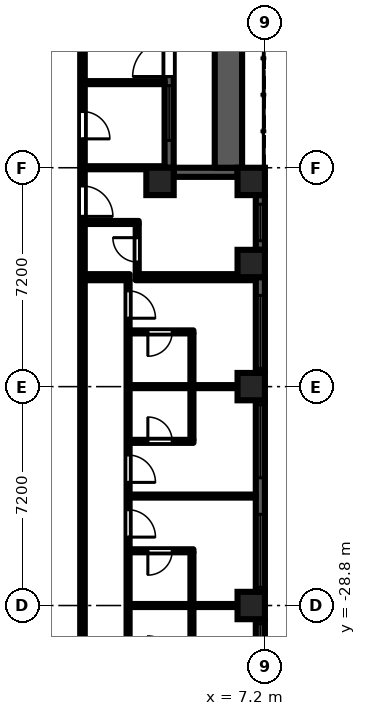
"""IFC4 building model, lengths in metres.
Left out: names, types, materials, properties, quantities, classifications, styles, units other than length and angle.
Written with IfcOpenShell. Run it as: python <this file> out.ifc"""

import sys

from ifc_helpers import new_model, si_unit, direction, frame, frame_2d, origin, origin_2d, place, context, subcontext, project, spatial, rectangle, extrude, element, fill, save


model = new_model("IFC4")
c1 = context("Model", 3, precision=1e-05, world=origin(), true_north=direction((0.0, 1.0)))
c2 = subcontext(c1, "Body", "Model", "MODEL_VIEW")
j1 = project(units=[si_unit("LENGTHUNIT", "METRE"), si_unit("PLANEANGLEUNIT", "RADIAN")], contexts=[c1])
p1 = place(None, origin())
s1 = spatial("IfcSite", under=j1, at=p1, CompositionType="ELEMENT")
p2 = place(p1, origin())
s2 = spatial("IfcBuilding", under=s1, at=p2, CompositionType="ELEMENT")
p3 = place(p2, frame((0.0, 0.0, 66.9)))
s3 = spatial("IfcBuildingStorey", under=s2, at=p3, CompositionType="ELEMENT", Elevation=66.9)
for number, where, z_axis, x_axis in (
    (1, (3.75, -14.85, 0.0), (0.0, 0.0, 1.0), (1.0, 0.0, 0.0)),
    (2, (6.75, -28.8, 0.0), (0.0, 0.0, 1.0), (1.0, 0.0, 0.0)),
    (3, (6.75, -21.6, 0.0), (0.0, 0.0, 1.0), (1.0, 0.0, 0.0)),
    (4, (6.75, -17.55, 0.0), (0.0, 0.0, 1.0), (1.0, 0.0, 0.0)),
    (5, (6.75, -14.85, 0.0), (0.0, 0.0, 1.0), (1.0, 0.0, 0.0)),
):
    element("IfcColumn", number, at=place(p3, frame(where, z_axis=z_axis, x_axis=x_axis)), inside=s3, PredefinedType="COLUMN", context=c2, shape_type="SweptSolid", body=[
        extrude(rectangle(XDim=0.9, YDim=0.9, at=origin_2d()), origin(), (0.0, 0.0, 1.0), 3.0),
    ])
p4 = place(p3, frame((7.05, -35.55, 0.0), z_axis=(0.0, 0.0, 1.0), x_axis=(0.0, 1.0, 0.0)))
e6 = element("IfcWall", 6, at=p4, inside=s3, PredefinedType="SOLIDWALL", context=c2, shape_type="SweptSolid", body=[
    extrude(rectangle(XDim=6.3, YDim=0.3, at=frame_2d((3.15, 0.0))), origin(), (0.0, 0.0, 1.0), 2.1),
])
p5 = place(p4, frame((3.75, 0.0, 0.2)))
e7 = element("IfcOpeningElement", 7, at=p5, cuts=e6, PredefinedType="OPENING", context=c2, shape_type="SweptSolid", body=[
    extrude(rectangle(XDim=2.4, YDim=1.85, at=frame_2d((1.2, 0.925))), frame((0.0, 0.16, 0.0), z_axis=(0.0, -1.0, 0.0), x_axis=(1.0, 0.0, 0.0)), (0.0, 0.0, 1.0), 0.32),
])
p6 = place(p3, frame((7.05, -28.35, 0.0), z_axis=(0.0, 0.0, 1.0), x_axis=(0.0, 1.0, 0.0)))
e8 = element("IfcWall", 8, at=p6, inside=s3, PredefinedType="SOLIDWALL", context=c2, shape_type="SweptSolid", body=[
    extrude(rectangle(XDim=6.3, YDim=0.3, at=frame_2d((3.15, 0.0))), origin(), (0.0, 0.0, 1.0), 2.1),
])
p7 = place(p6, frame((0.15, 0.0, 0.2)))
e9 = element("IfcOpeningElement", 9, at=p7, cuts=e8, PredefinedType="OPENING", context=c2, shape_type="SweptSolid", body=[
    extrude(rectangle(XDim=2.4, YDim=1.85, at=frame_2d((1.2, 0.925))), frame((0.0, 0.16, 0.0), z_axis=(0.0, -1.0, 0.0), x_axis=(1.0, 0.0, 0.0)), (0.0, 0.0, 1.0), 0.32),
])
p8 = place(p6, frame((3.75, 0.0, 0.2)))
e10 = element("IfcOpeningElement", 10, at=p8, cuts=e8, PredefinedType="OPENING", context=c2, shape_type="SweptSolid", body=[
    extrude(rectangle(XDim=2.4, YDim=1.85, at=frame_2d((1.2, 0.925))), frame((0.0, 0.16, 0.0), z_axis=(0.0, -1.0, 0.0), x_axis=(1.0, 0.0, 0.0)), (0.0, 0.0, 1.0), 0.32),
])
p9 = place(p3, frame((7.05, -21.15, 0.0), z_axis=(0.0, 0.0, 1.0), x_axis=(0.0, 1.0, 0.0)))
e11 = element("IfcWall", 11, at=p9, inside=s3, PredefinedType="SOLIDWALL", context=c2, shape_type="SweptSolid", body=[
    extrude(rectangle(XDim=3.15, YDim=0.3, at=frame_2d((1.575, 0.0))), origin(), (0.0, 0.0, 1.0), 2.1),
])
p10 = place(p9, frame((0.15, 0.0, 0.2)))
e12 = element("IfcOpeningElement", 12, at=p10, cuts=e11, PredefinedType="OPENING", context=c2, shape_type="SweptSolid", body=[
    extrude(rectangle(XDim=2.4, YDim=1.85, at=frame_2d((1.2, 0.925))), frame((0.0, 0.16, 0.0), z_axis=(0.0, -1.0, 0.0), x_axis=(1.0, 0.0, 0.0)), (0.0, 0.0, 1.0), 0.32),
])
p11 = place(p3, frame((7.05, -17.1, 0.0), z_axis=(0.0, 0.0, 1.0), x_axis=(0.0, 1.0, 0.0)))
e13 = element("IfcWall", 13, at=p11, inside=s3, PredefinedType="SOLIDWALL", context=c2, shape_type="SweptSolid", body=[
    extrude(rectangle(XDim=1.8, YDim=0.3, at=frame_2d((0.9, 0.0))), origin(), (0.0, 0.0, 1.0), 2.1),
])
p12 = place(p11, frame((0.3, 0.0, 0.2)))
e14 = element("IfcOpeningElement", 14, at=p12, cuts=e13, PredefinedType="OPENING", context=c2, shape_type="SweptSolid", body=[
    extrude(rectangle(XDim=1.2, YDim=1.85, at=frame_2d((0.6, 0.925))), frame((0.0, 0.16, 0.0), z_axis=(0.0, -1.0, 0.0), x_axis=(1.0, 0.0, 0.0)), (0.0, 0.0, 1.0), 0.32),
])
p13 = place(p3, frame((6.3, -14.55, 0.0), z_axis=(0.0, 0.0, 1.0), x_axis=(-1.0, 0.0, 0.0)))
e15 = element("IfcWall", 15, at=p13, inside=s3, PredefinedType="SOLIDWALL", context=c2, shape_type="SweptSolid", body=[
    extrude(rectangle(XDim=2.1, YDim=0.3, at=frame_2d((1.05, 0.0))), origin(), (0.0, 0.0, 1.0), 2.1),
])
p14 = place(p3, frame((4.05, -14.4, 0.0), z_axis=(0.0, 0.0, 1.0), x_axis=(0.0, 1.0, 0.0)))
e16 = element("IfcWall", 16, at=p14, inside=s3, PredefinedType="SOLIDWALL", context=c2, shape_type="SweptSolid", body=[
    extrude(rectangle(XDim=7.2, YDim=0.3, at=frame_2d((3.6, 0.0))), origin(), (0.0, 0.0, 1.0), 2.1),
])
p15 = place(p14, frame((3.0, 0.0, 0.0)))
e17 = element("IfcOpeningElement", 17, at=p15, cuts=e16, PredefinedType="OPENING", context=c2, shape_type="SweptSolid", body=[
    extrude(rectangle(XDim=1.2, YDim=2.05, at=frame_2d((0.6, 1.025))), frame((0.0, 0.16, 0.0), z_axis=(0.0, -1.0, 0.0), x_axis=(1.0, 0.0, 0.0)), (0.0, 0.0, 1.0), 0.32),
])
p16 = place(p14, frame((0.9, 0.0, 0.2)))
e18 = element("IfcOpeningElement", 18, at=p16, cuts=e16, PredefinedType="OPENING", context=c2, shape_type="SweptSolid", body=[
    extrude(rectangle(XDim=1.8, YDim=1.85, at=frame_2d((0.9, 0.925))), frame((0.0, 0.16, 0.0), z_axis=(0.0, -1.0, 0.0), x_axis=(1.0, 0.0, 0.0)), (0.0, 0.0, 1.0), 0.32),
])
p17 = place(p14, frame((4.5, 0.0, 0.2)))
e19 = element("IfcOpeningElement", 19, at=p17, cuts=e16, PredefinedType="OPENING", context=c2, shape_type="SweptSolid", body=[
    extrude(rectangle(XDim=1.8, YDim=1.85, at=frame_2d((0.9, 0.925))), frame((0.0, 0.16, 0.0), z_axis=(0.0, -1.0, 0.0), x_axis=(1.0, 0.0, 0.0)), (0.0, 0.0, 1.0), 0.32),
])
p18 = place(p3, frame((6.0, -14.4, 0.0), z_axis=(0.0, 0.0, 1.0), x_axis=(0.0, 1.0, 0.0)))
e20 = element("IfcWall", 20, at=p18, inside=s3, PredefinedType="PARAPET", context=c2, shape_type="SweptSolid", body=[
    extrude(rectangle(XDim=7.2, YDim=0.9, at=frame_2d((3.6, 0.0))), origin(), (0.0, 0.0, 1.0), 0.8),
])
p19 = place(p3, frame((1.2, -36.5, 0.0), z_axis=(0.0, 0.0, 1.0), x_axis=(0.0, 1.0, 0.0)))
e21 = element("IfcWall", 21, at=p19, inside=s3, PredefinedType="PARTITIONING", context=c2, shape_type="SweptSolid", body=[
    extrude(rectangle(XDim=35.375, YDim=0.15, at=frame_2d((17.688, 0.0))), origin(), (0.0, 0.0, 1.0), 2.575),
])
p20 = place(p19, frame((31.85, 0.0, 0.0)))
e22 = element("IfcOpeningElement", 22, at=p20, cuts=e21, PredefinedType="OPENING", context=c2, shape_type="SweptSolid", body=[
    extrude(rectangle(XDim=0.9, YDim=2.1, at=frame_2d((0.45, 1.05))), frame((0.0, 0.085, 0.0), z_axis=(0.0, -1.0, 0.0), x_axis=(1.0, 0.0, 0.0)), (0.0, 0.0, 1.0), 0.17),
])
p21 = place(p19, frame((23.05, 0.0, 0.0)))
e23 = element("IfcOpeningElement", 23, at=p21, cuts=e21, PredefinedType="OPENING", context=c2, shape_type="SweptSolid", body=[
    extrude(rectangle(XDim=0.9, YDim=2.1, at=frame_2d((0.45, 1.05))), frame((0.0, 0.085, 0.0), z_axis=(0.0, -1.0, 0.0), x_axis=(1.0, 0.0, 0.0)), (0.0, 0.0, 1.0), 0.17),
])
p22 = place(p19, frame((26.65, 0.0, 0.0)))
e24 = element("IfcOpeningElement", 24, at=p22, cuts=e21, PredefinedType="OPENING", context=c2, shape_type="SweptSolid", body=[
    extrude(rectangle(XDim=0.9, YDim=2.1, at=frame_2d((0.45, 1.05))), frame((0.0, 0.085, 0.0), z_axis=(0.0, -1.0, 0.0), x_axis=(1.0, 0.0, 0.0)), (0.0, 0.0, 1.0), 0.17),
])
p23 = place(p19, frame((20.5, 0.0, 0.0)))
e25 = element("IfcOpeningElement", 25, at=p23, cuts=e21, PredefinedType="OPENING", context=c2, shape_type="SweptSolid", body=[
    extrude(rectangle(XDim=1.0, YDim=2.1, at=frame_2d((0.5, 1.05))), frame((0.0, 0.085, 0.0), z_axis=(0.0, -1.0, 0.0), x_axis=(1.0, 0.0, 0.0)), (0.0, 0.0, 1.0), 0.17),
])
p24 = place(p19, frame((1.55, 0.0, 0.0)))
e26 = element("IfcOpeningElement", 26, at=p24, cuts=e21, PredefinedType="OPENING", context=c2, shape_type="SweptSolid", body=[
    extrude(rectangle(XDim=1.0, YDim=2.1, at=frame_2d((0.5, 1.05))), frame((0.0, 0.085, 0.0), z_axis=(0.0, -1.0, 0.0), x_axis=(1.0, 0.0, 0.0)), (0.0, 0.0, 1.0), 0.17),
])
p25 = place(p3, frame((1.275, -18.0, 0.0), z_axis=(0.0, 0.0, 1.0), x_axis=(1.0, 0.0, 0.0)))
e27 = element("IfcWall", 27, at=p25, inside=s3, PredefinedType="PARTITIONING", context=c2, shape_type="SweptSolid", body=[
    extrude(rectangle(XDim=1.475, YDim=0.2, at=frame_2d((0.738, 0.0))), origin(), (0.0, 0.0, 1.0), 2.575),
])
p26 = place(p3, frame((1.275, -16.2, 0.0), z_axis=(0.0, 0.0, 1.0), x_axis=(1.0, 0.0, 0.0)))
e28 = element("IfcWall", 28, at=p26, inside=s3, PredefinedType="PARTITIONING", context=c2, shape_type="SweptSolid", body=[
    extrude(rectangle(XDim=1.775, YDim=0.1, at=frame_2d((0.888, 0.0))), origin(), (0.0, 0.0, 1.0), 2.575),
])
for number, where, z_axis, x_axis in (
    (29, (1.275, -14.4, 0.0), (0.0, 0.0, 1.0), (1.0, 0.0, 0.0)),
    (30, (1.275, -11.6, 0.0), (0.0, 0.0, 1.0), (1.0, 0.0, 0.0)),
):
    element("IfcWall", number, at=place(p3, frame(where, z_axis=z_axis, x_axis=x_axis)), inside=s3, PredefinedType="PARTITIONING", context=c2, shape_type="SweptSolid", body=[
        extrude(rectangle(XDim=2.625, YDim=0.1, at=frame_2d((1.312, 0.0))), origin(), (0.0, 0.0, 1.0), 2.575),
    ])
p27 = place(p3, frame((2.7, -32.35, 0.0), z_axis=(0.0, 0.0, 1.0), x_axis=(0.0, 1.0, 0.0)))
e31 = element("IfcWall", 31, at=p27, inside=s3, PredefinedType="PARTITIONING", context=c2, shape_type="SweptSolid", body=[
    extrude(rectangle(XDim=14.25, YDim=0.1, at=frame_2d((7.125, 0.0))), origin(), (0.0, 0.0, 1.0), 2.575),
])
p28 = place(p27, frame((0.4, 0.0, 0.0)))
e32 = element("IfcOpeningElement", 32, at=p28, cuts=e31, PredefinedType="OPENING", context=c2, shape_type="SweptSolid", body=[
    extrude(rectangle(XDim=0.9, YDim=2.1, at=frame_2d((0.45, 1.05))), frame((0.0, 0.06, 0.0), z_axis=(0.0, -1.0, 0.0), x_axis=(1.0, 0.0, 0.0)), (0.0, 0.0, 1.0), 0.12),
])
p29 = place(p27, frame((5.8, 0.0, 0.0)))
e33 = element("IfcOpeningElement", 33, at=p29, cuts=e31, PredefinedType="OPENING", context=c2, shape_type="SweptSolid", body=[
    extrude(rectangle(XDim=0.9, YDim=2.1, at=frame_2d((0.45, 1.05))), frame((0.0, 0.06, 0.0), z_axis=(0.0, -1.0, 0.0), x_axis=(1.0, 0.0, 0.0)), (0.0, 0.0, 1.0), 0.12),
])
p30 = place(p27, frame((7.6, 0.0, 0.0)))
e34 = element("IfcOpeningElement", 34, at=p30, cuts=e31, PredefinedType="OPENING", context=c2, shape_type="SweptSolid", body=[
    extrude(rectangle(XDim=0.9, YDim=2.1, at=frame_2d((0.45, 1.05))), frame((0.0, 0.06, 0.0), z_axis=(0.0, -1.0, 0.0), x_axis=(1.0, 0.0, 0.0)), (0.0, 0.0, 1.0), 0.12),
])
p31 = place(p27, frame((13.0, 0.0, 0.0)))
e35 = element("IfcOpeningElement", 35, at=p31, cuts=e31, PredefinedType="OPENING", context=c2, shape_type="SweptSolid", body=[
    extrude(rectangle(XDim=0.9, YDim=2.1, at=frame_2d((0.45, 1.05))), frame((0.0, 0.06, 0.0), z_axis=(0.0, -1.0, 0.0), x_axis=(1.0, 0.0, 0.0)), (0.0, 0.0, 1.0), 0.12),
])
p32 = place(p3, frame((2.75, -28.8, 0.0), z_axis=(0.0, 0.0, 1.0), x_axis=(1.0, 0.0, 0.0)))
e36 = element("IfcWall", 36, at=p32, inside=s3, PredefinedType="PARTITIONING", context=c2, shape_type="SweptSolid", body=[
    extrude(rectangle(XDim=4.15, YDim=0.1, at=frame_2d((2.075, 0.0))), origin(), (0.0, 0.0, 1.0), 2.575),
])
p33 = place(p3, frame((2.75, -27.0, 0.0), z_axis=(0.0, 0.0, 1.0), x_axis=(1.0, 0.0, 0.0)))
e37 = element("IfcWall", 37, at=p33, inside=s3, PredefinedType="PARTITIONING", context=c2, shape_type="SweptSolid", body=[
    extrude(rectangle(XDim=2.1, YDim=0.1, at=frame_2d((1.05, 0.0))), origin(), (0.0, 0.0, 1.0), 2.575),
])
p34 = place(p33, frame((0.6, 0.0, 0.0)))
e38 = element("IfcOpeningElement", 38, at=p34, cuts=e37, PredefinedType="OPENING", context=c2, shape_type="SweptSolid", body=[
    extrude(rectangle(XDim=0.8, YDim=2.1, at=frame_2d((0.4, 1.05))), frame((0.0, 0.06, 0.0), z_axis=(0.0, -1.0, 0.0), x_axis=(1.0, 0.0, 0.0)), (0.0, 0.0, 1.0), 0.12),
])
p35 = place(p3, frame((2.75, -25.2, 0.0), z_axis=(0.0, 0.0, 1.0), x_axis=(1.0, 0.0, 0.0)))
e39 = element("IfcWall", 39, at=p35, inside=s3, PredefinedType="PARTITIONING", context=c2, shape_type="SweptSolid", body=[
    extrude(rectangle(XDim=4.15, YDim=0.1, at=frame_2d((2.075, 0.0))), origin(), (0.0, 0.0, 1.0), 2.575),
])
p36 = place(p3, frame((2.75, -23.4, 0.0), z_axis=(0.0, 0.0, 1.0), x_axis=(1.0, 0.0, 0.0)))
e40 = element("IfcWall", 40, at=p36, inside=s3, PredefinedType="PARTITIONING", context=c2, shape_type="SweptSolid", body=[
    extrude(rectangle(XDim=2.1, YDim=0.1, at=frame_2d((1.05, 0.0))), origin(), (0.0, 0.0, 1.0), 2.575),
])
p37 = place(p36, frame((0.6, 0.0, 0.0)))
e41 = element("IfcOpeningElement", 41, at=p37, cuts=e40, PredefinedType="OPENING", context=c2, shape_type="SweptSolid", body=[
    extrude(rectangle(XDim=0.8, YDim=2.1, at=frame_2d((0.4, 1.05))), frame((0.0, 0.06, 0.0), z_axis=(0.0, -1.0, 0.0), x_axis=(1.0, 0.0, 0.0)), (0.0, 0.0, 1.0), 0.12),
])
p38 = place(p3, frame((2.75, -21.6, 0.0), z_axis=(0.0, 0.0, 1.0), x_axis=(1.0, 0.0, 0.0)))
e42 = element("IfcWall", 42, at=p38, inside=s3, PredefinedType="PARTITIONING", context=c2, shape_type="SweptSolid", body=[
    extrude(rectangle(XDim=4.15, YDim=0.1, at=frame_2d((2.075, 0.0))), origin(), (0.0, 0.0, 1.0), 2.575),
])
p39 = place(p3, frame((2.75, -19.8, 0.0), z_axis=(0.0, 0.0, 1.0), x_axis=(1.0, 0.0, 0.0)))
e43 = element("IfcWall", 43, at=p39, inside=s3, PredefinedType="PARTITIONING", context=c2, shape_type="SweptSolid", body=[
    extrude(rectangle(XDim=2.1, YDim=0.1, at=frame_2d((1.05, 0.0))), origin(), (0.0, 0.0, 1.0), 2.575),
])
p40 = place(p39, frame((0.6, 0.0, 0.0)))
e44 = element("IfcOpeningElement", 44, at=p40, cuts=e43, PredefinedType="OPENING", context=c2, shape_type="SweptSolid", body=[
    extrude(rectangle(XDim=0.8, YDim=2.1, at=frame_2d((0.4, 1.05))), frame((0.0, 0.06, 0.0), z_axis=(0.0, -1.0, 0.0), x_axis=(1.0, 0.0, 0.0)), (0.0, 0.0, 1.0), 0.12),
])
p41 = place(p3, frame((3.0, -17.9, 0.0), z_axis=(0.0, 0.0, 1.0), x_axis=(0.0, 1.0, 0.0)))
e45 = element("IfcWall", 45, at=p41, inside=s3, PredefinedType="PARTITIONING", context=c2, shape_type="SweptSolid", body=[
    extrude(rectangle(XDim=1.65, YDim=0.1, at=frame_2d((0.825, 0.0))), origin(), (0.0, 0.0, 1.0), 2.575),
])
p42 = place(p41, frame((0.4, 0.0, 0.0)))
e46 = element("IfcOpeningElement", 46, at=p42, cuts=e45, PredefinedType="OPENING", context=c2, shape_type="SweptSolid", body=[
    extrude(rectangle(XDim=0.8, YDim=2.1, at=frame_2d((0.4, 1.05))), frame((0.0, 0.06, 0.0), z_axis=(0.0, -1.0, 0.0), x_axis=(1.0, 0.0, 0.0)), (0.0, 0.0, 1.0), 0.12),
])
p43 = place(p3, frame((2.95, -18.0, 0.0), z_axis=(0.0, 0.0, 1.0), x_axis=(1.0, 0.0, 0.0)))
e47 = element("IfcWall", 47, at=p43, inside=s3, PredefinedType="PARTITIONING", context=c2, shape_type="SweptSolid", body=[
    extrude(rectangle(XDim=3.95, YDim=0.2, at=frame_2d((1.975, 0.0))), origin(), (0.0, 0.0, 1.0), 2.575),
])
for number, where, z_axis, x_axis in (
    (48, (4.8, -30.55, 0.0), (0.0, 0.0, 1.0), (0.0, 1.0, 0.0)),
    (49, (4.8, -23.35, 0.0), (0.0, 0.0, 1.0), (0.0, 1.0, 0.0)),
):
    element("IfcWall", number, at=place(p3, frame(where, z_axis=z_axis, x_axis=x_axis)), inside=s3, PredefinedType="PARTITIONING", context=c2, shape_type="SweptSolid", body=[
        extrude(rectangle(XDim=3.5, YDim=0.1, at=frame_2d((1.75, 0.0))), origin(), (0.0, 0.0, 1.0), 2.575),
    ])
p44 = place(p5, origin())
e50 = element("IfcWindow", 50, at=p44, inside=s3, PartitioningType="SINGLE_PANEL", PredefinedType="WINDOW", context=c2, shape_type="SweptSolid", body=[
    extrude(rectangle(XDim=2.4, YDim=1.85, at=frame_2d((1.2, 0.925))), frame((0.0, 0.03, 0.0), z_axis=(0.0, -1.0, 0.0), x_axis=(1.0, 0.0, 0.0)), (0.0, 0.0, 1.0), 0.06),
])
fill(e7, e50)
p45 = place(p7, origin())
e51 = element("IfcWindow", 51, at=p45, inside=s3, PartitioningType="SINGLE_PANEL", PredefinedType="WINDOW", context=c2, shape_type="SweptSolid", body=[
    extrude(rectangle(XDim=2.4, YDim=1.85, at=frame_2d((1.2, 0.925))), frame((0.0, 0.03, 0.0), z_axis=(0.0, -1.0, 0.0), x_axis=(1.0, 0.0, 0.0)), (0.0, 0.0, 1.0), 0.06),
])
fill(e9, e51)
p46 = place(p8, origin())
e52 = element("IfcWindow", 52, at=p46, inside=s3, PartitioningType="SINGLE_PANEL", PredefinedType="WINDOW", context=c2, shape_type="SweptSolid", body=[
    extrude(rectangle(XDim=2.4, YDim=1.85, at=frame_2d((1.2, 0.925))), frame((0.0, 0.03, 0.0), z_axis=(0.0, -1.0, 0.0), x_axis=(1.0, 0.0, 0.0)), (0.0, 0.0, 1.0), 0.06),
])
fill(e10, e52)
p47 = place(p10, origin())
e53 = element("IfcWindow", 53, at=p47, inside=s3, PartitioningType="SINGLE_PANEL", PredefinedType="WINDOW", context=c2, shape_type="SweptSolid", body=[
    extrude(rectangle(XDim=2.4, YDim=1.85, at=frame_2d((1.2, 0.925))), frame((0.0, 0.03, 0.0), z_axis=(0.0, -1.0, 0.0), x_axis=(1.0, 0.0, 0.0)), (0.0, 0.0, 1.0), 0.06),
])
fill(e12, e53)
p48 = place(p12, origin())
e54 = element("IfcWindow", 54, at=p48, inside=s3, PartitioningType="SINGLE_PANEL", PredefinedType="WINDOW", context=c2, shape_type="SweptSolid", body=[
    extrude(rectangle(XDim=1.2, YDim=1.85, at=frame_2d((0.6, 0.925))), frame((0.0, 0.03, 0.0), z_axis=(0.0, -1.0, 0.0), x_axis=(1.0, 0.0, 0.0)), (0.0, 0.0, 1.0), 0.06),
])
fill(e14, e54)
p49 = place(p15, origin())
e55 = element("IfcDoor", 55, at=p49, inside=s3, OperationType="SINGLE_SWING_LEFT", PredefinedType="DOOR", context=c2, shape_type="SweptSolid", body=[
    extrude(rectangle(XDim=1.2, YDim=2.05, at=frame_2d((0.6, 1.025))), frame((0.0, 0.025, 0.0), z_axis=(0.0, -1.0, 0.0), x_axis=(1.0, 0.0, 0.0)), (0.0, 0.0, 1.0), 0.05),
])
fill(e17, e55)
p50 = place(p16, origin())
e56 = element("IfcWindow", 56, at=p50, inside=s3, PartitioningType="SINGLE_PANEL", PredefinedType="WINDOW", context=c2, shape_type="SweptSolid", body=[
    extrude(rectangle(XDim=1.8, YDim=1.85, at=frame_2d((0.9, 0.925))), frame((0.0, 0.03, 0.0), z_axis=(0.0, -1.0, 0.0), x_axis=(1.0, 0.0, 0.0)), (0.0, 0.0, 1.0), 0.06),
])
fill(e18, e56)
p51 = place(p21, frame((0.9, 0.0, 0.0), z_axis=(0.0, 0.0, 1.0), x_axis=(-1.0, 0.0, 0.0)))
e57 = element("IfcDoor", 57, at=p51, inside=s3, OperationType="SINGLE_SWING_RIGHT", PredefinedType="DOOR", context=c2, shape_type="SweptSolid", body=[
    extrude(rectangle(XDim=0.9, YDim=2.1, at=frame_2d((0.45, 1.05))), frame((0.0, 0.025, 0.0), z_axis=(0.0, -1.0, 0.0), x_axis=(1.0, 0.0, 0.0)), (0.0, 0.0, 1.0), 0.05),
])
fill(e23, e57)
p52 = place(p42, origin())
e58 = element("IfcDoor", 58, at=p52, inside=s3, OperationType="SINGLE_SWING_RIGHT", PredefinedType="DOOR", context=c2, shape_type="SweptSolid", body=[
    extrude(rectangle(XDim=0.8, YDim=2.1, at=frame_2d((0.4, 1.05))), frame((0.0, 0.025, 0.0), z_axis=(0.0, -1.0, 0.0), x_axis=(1.0, 0.0, 0.0)), (0.0, 0.0, 1.0), 0.05),
])
fill(e46, e58)
p53 = place(p23, frame((1.0, 0.0, 0.0), z_axis=(0.0, 0.0, 1.0), x_axis=(-1.0, 0.0, 0.0)))
e59 = element("IfcDoor", 59, at=p53, inside=s3, OperationType="SINGLE_SWING_RIGHT", PredefinedType="DOOR", context=c2, shape_type="SweptSolid", body=[
    extrude(rectangle(XDim=1.0, YDim=2.1, at=frame_2d((0.5, 1.05))), frame((0.0, 0.025, 0.0), z_axis=(0.0, -1.0, 0.0), x_axis=(1.0, 0.0, 0.0)), (0.0, 0.0, 1.0), 0.05),
])
fill(e25, e59)
p54 = place(p29, frame((0.9, 0.0, 0.0), z_axis=(0.0, 0.0, 1.0), x_axis=(-1.0, 0.0, 0.0)))
e60 = element("IfcDoor", 60, at=p54, inside=s3, OperationType="SINGLE_SWING_RIGHT", PredefinedType="DOOR", context=c2, shape_type="SweptSolid", body=[
    extrude(rectangle(XDim=0.9, YDim=2.1, at=frame_2d((0.45, 1.05))), frame((0.0, 0.025, 0.0), z_axis=(0.0, -1.0, 0.0), x_axis=(1.0, 0.0, 0.0)), (0.0, 0.0, 1.0), 0.05),
])
fill(e33, e60)
p55 = place(p30, frame((0.9, 0.0, 0.0), z_axis=(0.0, 0.0, 1.0), x_axis=(-1.0, 0.0, 0.0)))
e61 = element("IfcDoor", 61, at=p55, inside=s3, OperationType="SINGLE_SWING_RIGHT", PredefinedType="DOOR", context=c2, shape_type="SweptSolid", body=[
    extrude(rectangle(XDim=0.9, YDim=2.1, at=frame_2d((0.45, 1.05))), frame((0.0, 0.025, 0.0), z_axis=(0.0, -1.0, 0.0), x_axis=(1.0, 0.0, 0.0)), (0.0, 0.0, 1.0), 0.05),
])
fill(e34, e61)
p56 = place(p31, frame((0.9, 0.0, 0.0), z_axis=(0.0, 0.0, 1.0), x_axis=(-1.0, 0.0, 0.0)))
e62 = element("IfcDoor", 62, at=p56, inside=s3, OperationType="SINGLE_SWING_RIGHT", PredefinedType="DOOR", context=c2, shape_type="SweptSolid", body=[
    extrude(rectangle(XDim=0.9, YDim=2.1, at=frame_2d((0.45, 1.05))), frame((0.0, 0.025, 0.0), z_axis=(0.0, -1.0, 0.0), x_axis=(1.0, 0.0, 0.0)), (0.0, 0.0, 1.0), 0.05),
])
fill(e35, e62)
p57 = place(p40, frame((0.8, 0.0, 0.0), z_axis=(0.0, 0.0, 1.0), x_axis=(-1.0, 0.0, 0.0)))
e63 = element("IfcDoor", 63, at=p57, inside=s3, OperationType="SINGLE_SWING_RIGHT", PredefinedType="DOOR", context=c2, shape_type="SweptSolid", body=[
    extrude(rectangle(XDim=0.8, YDim=2.1, at=frame_2d((0.4, 1.05))), frame((0.0, 0.025, 0.0), z_axis=(0.0, -1.0, 0.0), x_axis=(1.0, 0.0, 0.0)), (0.0, 0.0, 1.0), 0.05),
])
fill(e44, e63)
p58 = place(p37, origin())
e64 = element("IfcDoor", 64, at=p58, inside=s3, OperationType="SINGLE_SWING_LEFT", PredefinedType="DOOR", context=c2, shape_type="SweptSolid", body=[
    extrude(rectangle(XDim=0.8, YDim=2.1, at=frame_2d((0.4, 1.05))), frame((0.0, 0.025, 0.0), z_axis=(0.0, -1.0, 0.0), x_axis=(1.0, 0.0, 0.0)), (0.0, 0.0, 1.0), 0.05),
])
fill(e41, e64)
p59 = place(p34, frame((0.8, 0.0, 0.0), z_axis=(0.0, 0.0, 1.0), x_axis=(-1.0, 0.0, 0.0)))
e65 = element("IfcDoor", 65, at=p59, inside=s3, OperationType="SINGLE_SWING_RIGHT", PredefinedType="DOOR", context=c2, shape_type="SweptSolid", body=[
    extrude(rectangle(XDim=0.8, YDim=2.1, at=frame_2d((0.4, 1.05))), frame((0.0, 0.025, 0.0), z_axis=(0.0, -1.0, 0.0), x_axis=(1.0, 0.0, 0.0)), (0.0, 0.0, 1.0), 0.05),
])
fill(e38, e65)
save(model, sys.argv[1])
